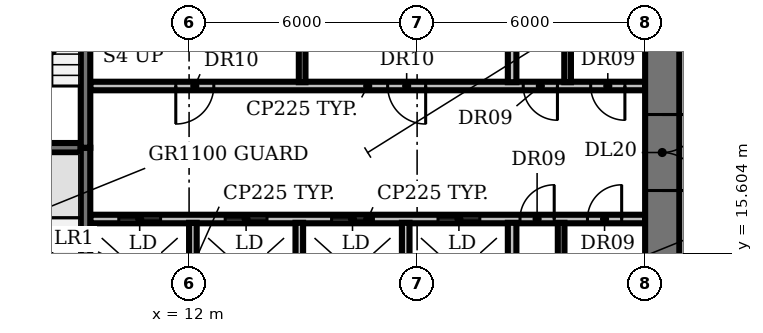
"""IFC4 building model, lengths in metres.
Left out: names, types, materials, properties, quantities, classifications, styles, units other than length and angle.
Written with IfcOpenShell. Run it as: python <this file> out.ifc"""

import sys

from ifc_helpers import new_model, si_unit, direction, frame, frame_2d, origin, place, context, subcontext, project, spatial, rectangle, extrude, element, fill, save


model = new_model("IFC4")
c1 = context("Model", 3, precision=1e-05, world=origin(), true_north=direction((0.0, 1.0)))
c2 = subcontext(c1, "Body", "Model", "MODEL_VIEW")
j1 = project(units=[si_unit("LENGTHUNIT", "METRE"), si_unit("PLANEANGLEUNIT", "RADIAN")], contexts=[c1])
p1 = place(None, origin())
s1 = spatial("IfcSite", under=j1, at=p1, CompositionType="ELEMENT")
p2 = place(p1, origin())
s2 = spatial("IfcBuilding", under=s1, at=p2, CompositionType="ELEMENT")
p3 = place(p2, frame((0.0, 0.0, 71.0)))
s3 = spatial("IfcBuildingStorey", under=s2, at=p3, CompositionType="ELEMENT", Elevation=71.0)
p4 = place(p3, frame((9.4, 16.5, 0.0), z_axis=(0.0, 0.0, 1.0), x_axis=(1.0, 0.0, 0.0)))
e1 = element("IfcWall", 1, at=p4, inside=s3, PredefinedType="PARTITIONING", context=c2, shape_type="SweptSolid", body=[
    extrude(rectangle(XDim=14.6, YDim=0.225, at=frame_2d((7.3, 0.0))), origin(), (0.0, 0.0, 1.0), 3.85),
])
p5 = place(p4, frame((0.75, 0.0, 0.0)))
e2 = element("IfcOpeningElement", 2, at=p5, cuts=e1, PredefinedType="OPENING", context=c2, shape_type="SweptSolid", body=[
    extrude(rectangle(XDim=1.1, YDim=2.1, at=frame_2d((0.55, 1.05))), frame((0.0, 0.123, 0.0), z_axis=(0.0, -1.0, 0.0), x_axis=(1.0, 0.0, 0.0)), (0.0, 0.0, 1.0), 0.245),
])
p6 = place(p4, frame((3.55, 0.0, 0.0)))
e3 = element("IfcOpeningElement", 3, at=p6, cuts=e1, PredefinedType="OPENING", context=c2, shape_type="SweptSolid", body=[
    extrude(rectangle(XDim=1.1, YDim=2.1, at=frame_2d((0.55, 1.05))), frame((0.0, 0.123, 0.0), z_axis=(0.0, -1.0, 0.0), x_axis=(1.0, 0.0, 0.0)), (0.0, 0.0, 1.0), 0.245),
])
p7 = place(p4, frame((6.35, 0.0, 0.0)))
e4 = element("IfcOpeningElement", 4, at=p7, cuts=e1, PredefinedType="OPENING", context=c2, shape_type="SweptSolid", body=[
    extrude(rectangle(XDim=1.1, YDim=2.1, at=frame_2d((0.55, 1.05))), frame((0.0, 0.123, 0.0), z_axis=(0.0, -1.0, 0.0), x_axis=(1.0, 0.0, 0.0)), (0.0, 0.0, 1.0), 0.245),
])
p8 = place(p4, frame((9.15, 0.0, 0.0)))
e5 = element("IfcOpeningElement", 5, at=p8, cuts=e1, PredefinedType="OPENING", context=c2, shape_type="SweptSolid", body=[
    extrude(rectangle(XDim=1.1, YDim=2.1, at=frame_2d((0.55, 1.05))), frame((0.0, 0.123, 0.0), z_axis=(0.0, -1.0, 0.0), x_axis=(1.0, 0.0, 0.0)), (0.0, 0.0, 1.0), 0.245),
])
p9 = place(p4, frame((11.308, 0.0, 0.0)))
e6 = element("IfcOpeningElement", 6, at=p9, cuts=e1, PredefinedType="OPENING", context=c2, shape_type="SweptSolid", body=[
    extrude(rectangle(XDim=0.9, YDim=2.1, at=frame_2d((0.45, 1.05))), frame((0.0, 0.123, 0.0), z_axis=(0.0, -1.0, 0.0), x_axis=(1.0, 0.0, 0.0)), (0.0, 0.0, 1.0), 0.245),
])
p10 = place(p4, frame((13.083, 0.0, 0.0)))
e7 = element("IfcOpeningElement", 7, at=p10, cuts=e1, PredefinedType="OPENING", context=c2, shape_type="SweptSolid", body=[
    extrude(rectangle(XDim=0.9, YDim=2.1, at=frame_2d((0.45, 1.05))), frame((0.0, 0.123, 0.0), z_axis=(0.0, -1.0, 0.0), x_axis=(1.0, 0.0, 0.0)), (0.0, 0.0, 1.0), 0.245),
])
p11 = place(p3, frame((6.0, 18.375, 0.0), z_axis=(0.0, 0.0, 1.0), x_axis=(1.0, 0.0, 0.0)))
e8 = element("IfcWall", 8, at=p11, inside=s3, PredefinedType="SHEAR", context=c2, shape_type="SweptSolid", body=[
    extrude(rectangle(XDim=3.15, YDim=0.25, at=frame_2d((1.575, 0.0))), origin(), (0.0, 0.0, 1.0), 3.85),
])
p12 = place(p3, frame((24.0, 20.0, 0.0), z_axis=(0.0, 0.0, 1.0), x_axis=(-1.0, 0.0, 0.0)))
e9 = element("IfcWall", 9, at=p12, inside=s3, PredefinedType="PARTITIONING", context=c2, shape_type="SweptSolid", body=[
    extrude(rectangle(XDim=14.6, YDim=0.225, at=frame_2d((7.3, 0.0))), origin(), (0.0, 0.0, 1.0), 3.85),
])
p13 = place(p12, frame((11.35, 0.0, 0.0)))
e10 = element("IfcOpeningElement", 10, at=p13, cuts=e9, PredefinedType="OPENING", context=c2, shape_type="SweptSolid", body=[
    extrude(rectangle(XDim=1.0, YDim=2.1, at=frame_2d((0.5, 1.05))), frame((0.0, 0.123, 0.0), z_axis=(0.0, -1.0, 0.0), x_axis=(1.0, 0.0, 0.0)), (0.0, 0.0, 1.0), 0.245),
])
p14 = place(p12, frame((5.775, 0.0, 0.0)))
e11 = element("IfcOpeningElement", 11, at=p14, cuts=e9, PredefinedType="OPENING", context=c2, shape_type="SweptSolid", body=[
    extrude(rectangle(XDim=1.0, YDim=2.1, at=frame_2d((0.5, 1.05))), frame((0.0, 0.123, 0.0), z_axis=(0.0, -1.0, 0.0), x_axis=(1.0, 0.0, 0.0)), (0.0, 0.0, 1.0), 0.245),
])
p15 = place(p12, frame((2.308, 0.0, 0.0)))
e12 = element("IfcOpeningElement", 12, at=p15, cuts=e9, PredefinedType="OPENING", context=c2, shape_type="SweptSolid", body=[
    extrude(rectangle(XDim=0.9, YDim=2.1, at=frame_2d((0.45, 1.05))), frame((0.0, 0.123, 0.0), z_axis=(0.0, -1.0, 0.0), x_axis=(1.0, 0.0, 0.0)), (0.0, 0.0, 1.0), 0.245),
])
p16 = place(p12, frame((0.532, 0.0, 0.0)))
e13 = element("IfcOpeningElement", 13, at=p16, cuts=e9, PredefinedType="OPENING", context=c2, shape_type="SweptSolid", body=[
    extrude(rectangle(XDim=0.9, YDim=2.1, at=frame_2d((0.45, 1.05))), frame((0.0, 0.123, 0.0), z_axis=(0.0, -1.0, 0.0), x_axis=(1.0, 0.0, 0.0)), (0.0, 0.0, 1.0), 0.245),
])
p17 = place(p3, frame((9.275, 18.375, 0.0), z_axis=(0.0, 0.0, 1.0), x_axis=(0.0, -1.0, 0.0)))
e14 = element("IfcWall", 14, at=p17, inside=s3, PredefinedType="SHEAR", context=c2, shape_type="SweptSolid", body=[
    extrude(rectangle(XDim=6.55, YDim=0.25, at=frame_2d((3.275, 0.0))), origin(), (0.0, 0.0, 1.0), 3.85),
])
p18 = place(p17, frame((5.075, 0.0, 0.0)))
e15 = element("IfcOpeningElement", 15, at=p18, cuts=e14, PredefinedType="OPENING", context=c2, shape_type="SweptSolid", body=[
    extrude(rectangle(XDim=1.0, YDim=2.1, at=frame_2d((0.5, 1.05))), frame((0.0, 0.135, 0.0), z_axis=(0.0, -1.0, 0.0), x_axis=(1.0, 0.0, 0.0)), (0.0, 0.0, 1.0), 0.27),
])
p19 = place(p3, frame((9.275, 18.375, 0.0), z_axis=(0.0, 0.0, 1.0), x_axis=(0.0, 1.0, 0.0)))
e16 = element("IfcWall", 16, at=p19, inside=s3, PredefinedType="SHEAR", context=c2, shape_type="SweptSolid", body=[
    extrude(rectangle(XDim=6.425, YDim=0.25, at=frame_2d((3.212, 0.0))), origin(), (0.0, 0.0, 1.0), 3.85),
])
for number, where, z_axis, x_axis in (
    (17, (12.1, 13.8, 0.0), (0.0, 0.0, 1.0), (0.0, 1.0, 0.0)),
    (18, (14.9, 13.8, 0.0), (0.0, 0.0, 1.0), (0.0, 1.0, 0.0)),
):
    element("IfcWall", number, at=place(p3, frame(where, z_axis=z_axis, x_axis=x_axis)), inside=s3, PredefinedType="SOLIDWALL", context=c2, shape_type="SweptSolid", body=[
        extrude(rectangle(XDim=2.6, YDim=0.2, at=frame_2d((1.3, 0.0))), origin(), (0.0, 0.0, 1.0), 3.85),
    ])
p20 = place(p3, frame((14.975, 20.1, 0.0), z_axis=(0.0, 0.0, 1.0), x_axis=(0.0, 1.0, 0.0)))
e19 = element("IfcWall", 19, at=p20, inside=s3, PredefinedType="PARTITIONING", context=c2, shape_type="SweptSolid", body=[
    extrude(rectangle(XDim=2.6, YDim=0.175, at=frame_2d((1.3, 0.0))), origin(), (0.0, 0.0, 1.0), 3.85),
])
p21 = place(p3, frame((17.7, 13.8, 0.0), z_axis=(0.0, 0.0, 1.0), x_axis=(0.0, 1.0, 0.0)))
e20 = element("IfcWall", 20, at=p21, inside=s3, PredefinedType="SOLIDWALL", context=c2, shape_type="SweptSolid", body=[
    extrude(rectangle(XDim=2.6, YDim=0.2, at=frame_2d((1.3, 0.0))), origin(), (0.0, 0.0, 1.0), 3.85),
])
for number, where, z_axis, x_axis in (
    (21, (20.5, 13.8, 0.0), (0.0, 0.0, 1.0), (0.0, 1.0, 0.0)),
    (22, (20.5, 20.1, 0.0), (0.0, 0.0, 1.0), (0.0, 1.0, 0.0)),
):
    element("IfcWall", number, at=place(p3, frame(where, z_axis=z_axis, x_axis=x_axis)), inside=s3, PredefinedType="PARTITIONING", context=c2, shape_type="SweptSolid", body=[
        extrude(rectangle(XDim=2.6, YDim=0.225, at=frame_2d((1.3, 0.0))), origin(), (0.0, 0.0, 1.0), 3.85),
    ])
for number, where, z_axis, x_axis in (
    (23, (21.79, 13.8, 0.0), (0.0, 0.0, 1.0), (0.0, 1.0, 0.0)),
    (24, (21.96, 20.1, 0.0), (0.0, 0.0, 1.0), (0.0, 1.0, 0.0)),
):
    element("IfcWall", number, at=place(p3, frame(where, z_axis=z_axis, x_axis=x_axis)), inside=s3, PredefinedType="PARTITIONING", context=c2, shape_type="SweptSolid", body=[
        extrude(rectangle(XDim=2.6, YDim=0.175, at=frame_2d((1.3, 0.0))), origin(), (0.0, 0.0, 1.0), 3.85),
    ])
p22 = place(p3, frame((24.45, 25.7, 0.0), z_axis=(0.0, 0.0, 1.0), x_axis=(0.0, -1.0, 0.0)))
e25 = element("IfcWall", 25, at=p22, inside=s3, PredefinedType="SHEAR", context=c2, shape_type="SweptSolid", body=[
    extrude(rectangle(XDim=21.2, YDim=0.9, at=frame_2d((10.6, 0.0))), origin(), (0.0, 0.0, 1.0), 3.85),
])
p23 = place(p22, frame((18.55, 0.0, 0.0)))
e26 = element("IfcOpeningElement", 26, at=p23, cuts=e25, PredefinedType="OPENING", context=c2, shape_type="SweptSolid", body=[
    extrude(rectangle(XDim=1.5, YDim=2.1, at=frame_2d((0.75, 1.05))), frame((0.0, 0.46, 0.0), z_axis=(0.0, -1.0, 0.0), x_axis=(1.0, 0.0, 0.0)), (0.0, 0.0, 1.0), 0.92),
])
p24 = place(p22, frame((12.45, 0.0, 0.0)))
e27 = element("IfcOpeningElement", 27, at=p24, cuts=e25, PredefinedType="OPENING", context=c2, shape_type="SweptSolid", body=[
    extrude(rectangle(XDim=0.9, YDim=2.1, at=frame_2d((0.45, 1.05))), frame((0.0, 0.46, 0.0), z_axis=(0.0, -1.0, 0.0), x_axis=(1.0, 0.0, 0.0)), (0.0, 0.0, 1.0), 0.92),
])
p25 = place(p22, frame((6.45, 0.0, 0.0)))
e28 = element("IfcOpeningElement", 28, at=p25, cuts=e25, PredefinedType="OPENING", context=c2, shape_type="SweptSolid", body=[
    extrude(rectangle(XDim=2.0, YDim=2.1, at=frame_2d((1.0, 1.05))), frame((0.0, 0.46, 0.0), z_axis=(0.0, -1.0, 0.0), x_axis=(1.0, 0.0, 0.0)), (0.0, 0.0, 1.0), 0.92),
])
p26 = place(p5, origin())
e29 = element("IfcDoor", 29, at=p26, inside=s3, OperationType="DOUBLE_DOOR_SLIDING", PredefinedType="DOOR", context=c2, shape_type="SweptSolid", body=[
    extrude(rectangle(XDim=1.1, YDim=2.1, at=frame_2d((0.55, 1.05))), frame((0.0, 0.025, 0.0), z_axis=(0.0, -1.0, 0.0), x_axis=(1.0, 0.0, 0.0)), (0.0, 0.0, 1.0), 0.05),
])
fill(e2, e29)
p27 = place(p6, origin())
e30 = element("IfcDoor", 30, at=p27, inside=s3, OperationType="DOUBLE_DOOR_SLIDING", PredefinedType="DOOR", context=c2, shape_type="SweptSolid", body=[
    extrude(rectangle(XDim=1.1, YDim=2.1, at=frame_2d((0.55, 1.05))), frame((0.0, 0.025, 0.0), z_axis=(0.0, -1.0, 0.0), x_axis=(1.0, 0.0, 0.0)), (0.0, 0.0, 1.0), 0.05),
])
fill(e3, e30)
p28 = place(p7, origin())
e31 = element("IfcDoor", 31, at=p28, inside=s3, OperationType="DOUBLE_DOOR_SLIDING", PredefinedType="DOOR", context=c2, shape_type="SweptSolid", body=[
    extrude(rectangle(XDim=1.1, YDim=2.1, at=frame_2d((0.55, 1.05))), frame((0.0, 0.025, 0.0), z_axis=(0.0, -1.0, 0.0), x_axis=(1.0, 0.0, 0.0)), (0.0, 0.0, 1.0), 0.05),
])
fill(e4, e31)
p29 = place(p8, origin())
e32 = element("IfcDoor", 32, at=p29, inside=s3, OperationType="DOUBLE_DOOR_SLIDING", PredefinedType="DOOR", context=c2, shape_type="SweptSolid", body=[
    extrude(rectangle(XDim=1.1, YDim=2.1, at=frame_2d((0.55, 1.05))), frame((0.0, 0.025, 0.0), z_axis=(0.0, -1.0, 0.0), x_axis=(1.0, 0.0, 0.0)), (0.0, 0.0, 1.0), 0.05),
])
fill(e5, e32)
p30 = place(p9, origin())
e33 = element("IfcDoor", 33, at=p30, inside=s3, OperationType="SINGLE_SWING_RIGHT", PredefinedType="DOOR", context=c2, shape_type="SweptSolid", body=[
    extrude(rectangle(XDim=0.9, YDim=2.1, at=frame_2d((0.45, 1.05))), frame((0.0, 0.025, 0.0), z_axis=(0.0, -1.0, 0.0), x_axis=(1.0, 0.0, 0.0)), (0.0, 0.0, 1.0), 0.05),
])
fill(e6, e33)
p31 = place(p10, origin())
e34 = element("IfcDoor", 34, at=p31, inside=s3, OperationType="SINGLE_SWING_RIGHT", PredefinedType="DOOR", context=c2, shape_type="SweptSolid", body=[
    extrude(rectangle(XDim=0.9, YDim=2.1, at=frame_2d((0.45, 1.05))), frame((0.0, 0.025, 0.0), z_axis=(0.0, -1.0, 0.0), x_axis=(1.0, 0.0, 0.0)), (0.0, 0.0, 1.0), 0.05),
])
fill(e7, e34)
p32 = place(p13, origin())
e35 = element("IfcDoor", 35, at=p32, inside=s3, OperationType="SINGLE_SWING_RIGHT", PredefinedType="DOOR", context=c2, shape_type="SweptSolid", body=[
    extrude(rectangle(XDim=1.0, YDim=2.1, at=frame_2d((0.5, 1.05))), frame((0.0, 0.025, 0.0), z_axis=(0.0, -1.0, 0.0), x_axis=(1.0, 0.0, 0.0)), (0.0, 0.0, 1.0), 0.05),
])
fill(e10, e35)
p33 = place(p14, origin())
e36 = element("IfcDoor", 36, at=p33, inside=s3, OperationType="SINGLE_SWING_LEFT", PredefinedType="DOOR", context=c2, shape_type="SweptSolid", body=[
    extrude(rectangle(XDim=1.0, YDim=2.1, at=frame_2d((0.5, 1.05))), frame((0.0, 0.025, 0.0), z_axis=(0.0, -1.0, 0.0), x_axis=(1.0, 0.0, 0.0)), (0.0, 0.0, 1.0), 0.05),
])
fill(e11, e36)
p34 = place(p15, origin())
e37 = element("IfcDoor", 37, at=p34, inside=s3, OperationType="SINGLE_SWING_LEFT", PredefinedType="DOOR", context=c2, shape_type="SweptSolid", body=[
    extrude(rectangle(XDim=0.9, YDim=2.1, at=frame_2d((0.45, 1.05))), frame((0.0, 0.025, 0.0), z_axis=(0.0, -1.0, 0.0), x_axis=(1.0, 0.0, 0.0)), (0.0, 0.0, 1.0), 0.05),
])
fill(e12, e37)
p35 = place(p16, origin())
e38 = element("IfcDoor", 38, at=p35, inside=s3, OperationType="SINGLE_SWING_LEFT", PredefinedType="DOOR", context=c2, shape_type="SweptSolid", body=[
    extrude(rectangle(XDim=0.9, YDim=2.1, at=frame_2d((0.45, 1.05))), frame((0.0, 0.025, 0.0), z_axis=(0.0, -1.0, 0.0), x_axis=(1.0, 0.0, 0.0)), (0.0, 0.0, 1.0), 0.05),
])
fill(e13, e38)
p36 = place(p25, origin())
e39 = element("IfcDoor", 39, at=p36, inside=s3, OperationType="DOUBLE_DOOR_SINGLE_SWING", PredefinedType="DOOR", context=c2, shape_type="SweptSolid", body=[
    extrude(rectangle(XDim=2.0, YDim=2.1, at=frame_2d((1.0, 1.05))), frame((0.0, 0.025, 0.0), z_axis=(0.0, -1.0, 0.0), x_axis=(1.0, 0.0, 0.0)), (0.0, 0.0, 1.0), 0.05),
])
fill(e28, e39)
save(model, sys.argv[1])
